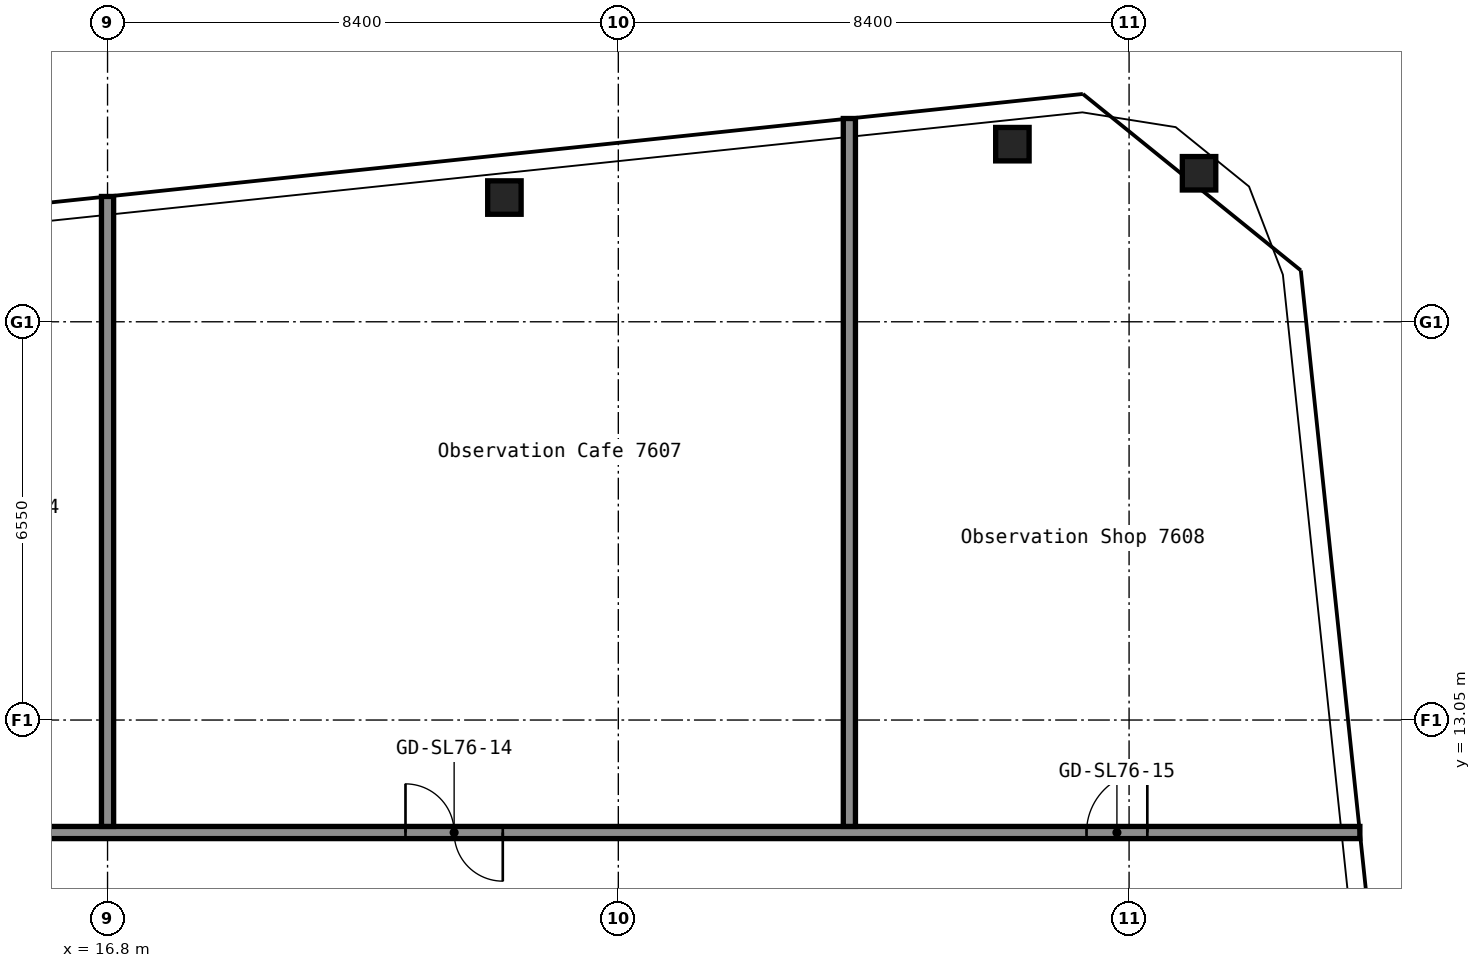
"""IFC4 building model, lengths in metres.
Left out: names, types, materials, properties, quantities, classifications, styles, units other than length and angle.
Written with IfcOpenShell. Run it as: python <this file> out.ifc"""

import sys

from ifc_helpers import new_model, si_unit, direction, frame, frame_2d, origin, origin_2d, place, context, subcontext, project, spatial, rectangle, hollow_rectangle, extrude, element, fill, save


model = new_model("IFC4")
c1 = context("Model", 3, precision=1e-05, world=origin(), true_north=direction((0.0, 1.0)))
c2 = subcontext(c1, "Body", "Model", "MODEL_VIEW")
j1 = project(units=[si_unit("LENGTHUNIT", "METRE"), si_unit("PLANEANGLEUNIT", "RADIAN")], contexts=[c1])
p1 = place(None, origin())
s1 = spatial("IfcSite", under=j1, at=p1, CompositionType="ELEMENT")
p2 = place(p1, origin())
s2 = spatial("IfcBuilding", under=s1, at=p2, CompositionType="ELEMENT")
p3 = place(p2, frame((0.0, 0.0, 270.6)))
s3 = spatial("IfcBuildingStorey", under=s2, at=p3, CompositionType="ELEMENT", Elevation=270.6)
for number, where, z_axis, x_axis in (
    (1, (23.327, 21.643, 0.0), (0.0, 0.0, 1.0), (1.0, 0.0, 0.0)),
    (2, (31.681, 22.521, 0.0), (0.0, 0.0, 1.0), (1.0, 0.0, 0.0)),
    (3, (34.751, 22.042, 0.0), (0.0, 0.0, 1.0), (1.0, 0.0, 0.0)),
):
    element("IfcColumn", number, at=place(p3, frame(where, z_axis=z_axis, x_axis=x_axis)), inside=s3, PredefinedType="COLUMN", context=c2, shape_type="SweptSolid", body=[
        extrude(hollow_rectangle(XDim=0.55, YDim=0.55, WallThickness=0.022, InnerFilletRadius=0.033, OuterFilletRadius=0.055, at=origin_2d()), origin(), (0.0, 0.0, 1.0), 5.55),
    ])
p4 = place(p3, frame((12.1, 11.2, 0.0), z_axis=(0.0, 0.0, 1.0), x_axis=(1.0, 0.0, 0.0)))
e4 = element("IfcWall", 4, at=p4, inside=s3, PredefinedType="PARTITIONING", context=c2, shape_type="SweptSolid", body=[
    extrude(rectangle(XDim=25.295, YDim=0.2, at=frame_2d((12.648, 0.0))), origin(), (0.0, 0.0, 1.0), 5.55),
])
p5 = place(p4, frame((1.8, 0.0, 0.0)))
e5 = element("IfcOpeningElement", 5, at=p5, cuts=e4, PredefinedType="OPENING", context=c2, shape_type="SweptSolid", body=[
    extrude(rectangle(XDim=1.0, YDim=2.1, at=frame_2d((0.5, 1.05))), frame((0.0, 0.11, 0.0), z_axis=(0.0, -1.0, 0.0), x_axis=(1.0, 0.0, 0.0)), (0.0, 0.0, 1.0), 0.22),
])
p6 = place(p4, frame((9.6, 0.0, 0.0)))
e6 = element("IfcOpeningElement", 6, at=p6, cuts=e4, PredefinedType="OPENING", context=c2, shape_type="SweptSolid", body=[
    extrude(rectangle(XDim=1.6, YDim=2.1, at=frame_2d((0.8, 1.05))), frame((0.0, 0.11, 0.0), z_axis=(0.0, -1.0, 0.0), x_axis=(1.0, 0.0, 0.0)), (0.0, 0.0, 1.0), 0.22),
])
p7 = place(p4, frame((20.8, 0.0, 0.0)))
e7 = element("IfcOpeningElement", 7, at=p7, cuts=e4, PredefinedType="OPENING", context=c2, shape_type="SweptSolid", body=[
    extrude(rectangle(XDim=1.0, YDim=2.1, at=frame_2d((0.5, 1.05))), frame((0.0, 0.11, 0.0), z_axis=(0.0, -1.0, 0.0), x_axis=(1.0, 0.0, 0.0)), (0.0, 0.0, 1.0), 0.22),
])
p8 = place(p3, frame((16.8, 11.3, 0.0), z_axis=(0.0, 0.0, 1.0), x_axis=(0.0, 1.0, 0.0)))
e8 = element("IfcWall", 8, at=p8, inside=s3, PredefinedType="PARTITIONING", context=c2, shape_type="SweptSolid", body=[
    extrude(rectangle(XDim=10.361, YDim=0.2, at=frame_2d((5.18, 0.0))), origin(), (0.0, 0.0, 1.0), 5.55),
])
p9 = place(p3, frame((29.0, 11.3, 0.0), z_axis=(0.0, 0.0, 1.0), x_axis=(0.0, 1.0, 0.0)))
e9 = element("IfcWall", 9, at=p9, inside=s3, PredefinedType="PARTITIONING", context=c2, shape_type="SweptSolid", body=[
    extrude(rectangle(XDim=11.643, YDim=0.2, at=frame_2d((5.822, 0.0))), origin(), (0.0, 0.0, 1.0), 5.55),
])
p10 = place(p6, origin())
e10 = element("IfcDoor", 10, at=p10, inside=s3, OperationType="DOUBLE_DOOR_SINGLE_SWING", PredefinedType="DOOR", context=c2, shape_type="SweptSolid", body=[
    extrude(rectangle(XDim=1.6, YDim=2.1, at=frame_2d((0.8, 1.05))), frame((0.0, 0.025, 0.0), z_axis=(0.0, -1.0, 0.0), x_axis=(1.0, 0.0, 0.0)), (0.0, 0.0, 1.0), 0.05),
])
fill(e6, e10)
p11 = place(p7, origin())
e11 = element("IfcDoor", 11, at=p11, inside=s3, OperationType="SINGLE_SWING_LEFT", PredefinedType="DOOR", context=c2, shape_type="SweptSolid", body=[
    extrude(rectangle(XDim=1.0, YDim=2.1, at=frame_2d((0.5, 1.05))), frame((0.0, 0.025, 0.0), z_axis=(0.0, -1.0, 0.0), x_axis=(1.0, 0.0, 0.0)), (0.0, 0.0, 1.0), 0.05),
])
fill(e7, e11)
save(model, sys.argv[1])
